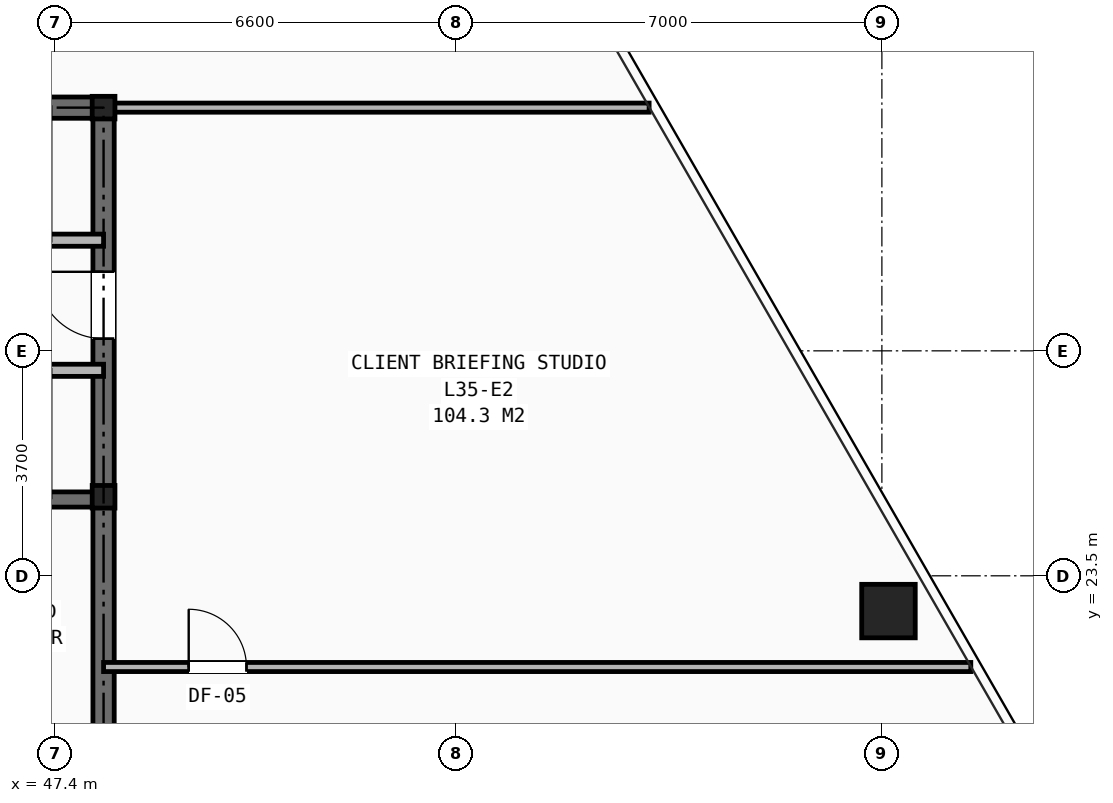
"""IFC4 building model, lengths in metres.
Left out: names, types, materials, properties, quantities, classifications, styles, units other than length and angle.
Written with IfcOpenShell. Run it as: python <this file> out.ifc"""

import sys

from ifc_helpers import new_model, si_unit, direction, frame, frame_2d, origin, origin_2d, place, context, subcontext, project, spatial, rectangle, hollow_rectangle, i_section, extrude, element, fill, save


model = new_model("IFC4")
c1 = context("Model", 3, precision=1e-05, world=origin(), true_north=direction((0.0, 1.0)))
c2 = subcontext(c1, "Body", "Model", "MODEL_VIEW")
j1 = project(units=[si_unit("LENGTHUNIT", "METRE"), si_unit("PLANEANGLEUNIT", "RADIAN")], contexts=[c1])
p1 = place(None, origin())
s1 = spatial("IfcSite", under=j1, at=p1, CompositionType="ELEMENT")
p2 = place(p1, origin())
s2 = spatial("IfcBuilding", under=s1, at=p2, CompositionType="ELEMENT")
p3 = place(p2, frame((0.0, 0.0, 122.9)))
s3 = spatial("IfcBuildingStorey", under=s2, at=p3, CompositionType="ELEMENT", Elevation=122.9)
for number, where, z_axis, x_axis in (
    (1, (48.2, 24.8, 0.0), (0.0, 0.0, 1.0), (1.0, 0.0, 0.0)),
    (2, (48.2, 31.2, 0.0), (0.0, 0.0, 1.0), (1.0, 0.0, 0.0)),
):
    element("IfcColumn", number, at=place(p3, frame(where, z_axis=z_axis, x_axis=x_axis)), inside=s3, PredefinedType="COLUMN", context=c2, shape_type="SweptSolid", body=[
        extrude(i_section(OverallWidth=0.374, OverallDepth=0.372, WebThickness=0.016, FlangeThickness=0.026, at=origin_2d()), origin(), (0.0, 0.0, 1.0), 3.45),
    ])
p4 = place(p3, frame((61.108, 22.92, 0.0), z_axis=(0.0, 0.0, 1.0), x_axis=(1.0, 0.0, 0.0)))
e3 = element("IfcColumn", 3, at=p4, inside=s3, PredefinedType="COLUMN", context=c2, shape_type="SweptSolid", body=[
    extrude(hollow_rectangle(XDim=0.88, YDim=0.88, WallThickness=0.06, at=origin_2d()), origin(), (0.0, 0.0, 1.0), 3.45),
])
p5 = place(p3, frame((31.8, 31.2, 0.0), z_axis=(0.0, 0.0, 1.0), x_axis=(1.0, 0.0, 0.0)))
e4 = element("IfcWall", 4, at=p5, inside=s3, PredefinedType="SHEAR", context=c2, shape_type="SweptSolid", body=[
    extrude(rectangle(XDim=16.4, YDim=0.35, at=frame_2d((8.2, 0.0))), origin(), (0.0, 0.0, 1.0), 3.21),
])
p6 = place(p3, frame((48.2, 16.4, 0.0), z_axis=(0.0, 0.0, 1.0), x_axis=(0.0, 1.0, 0.0)))
e5 = element("IfcWall", 5, at=p6, inside=s3, PredefinedType="SHEAR", context=c2, shape_type="SweptSolid", body=[
    extrude(rectangle(XDim=14.8, YDim=0.35, at=frame_2d((7.4, 0.0))), origin(), (0.0, 0.0, 1.0), 3.21),
])
p7 = place(p6, frame((11.0, 0.0, 0.0)))
e6 = element("IfcOpeningElement", 6, at=p7, cuts=e5, PredefinedType="OPENING", context=c2, shape_type="SweptSolid", body=[
    extrude(rectangle(XDim=1.1, YDim=2.15, at=frame_2d((0.55, 1.075))), frame((0.0, 0.185, 0.0), z_axis=(0.0, -1.0, 0.0), x_axis=(1.0, 0.0, 0.0)), (0.0, 0.0, 1.0), 0.37),
])
p8 = place(p3, frame((44.955, 24.755, 0.0), z_axis=(0.0, 0.0, 1.0), x_axis=(1.0, 0.0, 0.0)))
e7 = element("IfcWall", 7, at=p8, inside=s3, PredefinedType="SHEAR", context=c2, shape_type="SweptSolid", body=[
    extrude(rectangle(XDim=3.245, YDim=0.25, at=frame_2d((1.623, 0.0))), origin(), (0.0, 0.0, 1.0), 3.21),
])
p9 = place(p3, frame((33.82, 29.02, 0.0), z_axis=(0.0, 0.0, 1.0), x_axis=(1.0, 0.0, 0.0)))
e8 = element("IfcWall", 8, at=p9, inside=s3, PredefinedType="SOLIDWALL", context=c2, shape_type="SweptSolid", body=[
    extrude(rectangle(XDim=14.38, YDim=0.2, at=frame_2d((7.19, 0.0))), origin(), (0.0, 0.0, 1.0), 2.661),
])
p10 = place(p9, frame((3.92, 0.0, 0.0)))
e9 = element("IfcOpeningElement", 9, at=p10, cuts=e8, PredefinedType="OPENING", context=c2, shape_type="SweptSolid", body=[
    extrude(rectangle(XDim=0.9, YDim=2.1, at=frame_2d((0.45, 1.05))), frame((0.0, 0.11, 0.0), z_axis=(0.0, -1.0, 0.0), x_axis=(1.0, 0.0, 0.0)), (0.0, 0.0, 1.0), 0.22),
])
p11 = place(p3, frame((33.82, 26.88, 0.0), z_axis=(0.0, 0.0, 1.0), x_axis=(1.0, 0.0, 0.0)))
e10 = element("IfcWall", 10, at=p11, inside=s3, PredefinedType="SOLIDWALL", context=c2, shape_type="SweptSolid", body=[
    extrude(rectangle(XDim=14.38, YDim=0.2, at=frame_2d((7.19, 0.0))), origin(), (0.0, 0.0, 1.0), 2.661),
])
p12 = place(p11, frame((0.53, 0.0, 0.0)))
e11 = element("IfcOpeningElement", 11, at=p12, cuts=e10, PredefinedType="OPENING", context=c2, shape_type="SweptSolid", body=[
    extrude(rectangle(XDim=1.1, YDim=2.15, at=frame_2d((0.55, 1.075))), frame((0.0, 0.11, 0.0), z_axis=(0.0, -1.0, 0.0), x_axis=(1.0, 0.0, 0.0)), (0.0, 0.0, 1.0), 0.22),
])
p13 = place(p11, frame((2.69, 0.0, 0.0)))
e12 = element("IfcOpeningElement", 12, at=p13, cuts=e10, PredefinedType="OPENING", context=c2, shape_type="SweptSolid", body=[
    extrude(rectangle(XDim=1.1, YDim=2.15, at=frame_2d((0.55, 1.075))), frame((0.0, 0.11, 0.0), z_axis=(0.0, -1.0, 0.0), x_axis=(1.0, 0.0, 0.0)), (0.0, 0.0, 1.0), 0.22),
])
p14 = place(p11, frame((4.85, 0.0, 0.0)))
e13 = element("IfcOpeningElement", 13, at=p14, cuts=e10, PredefinedType="OPENING", context=c2, shape_type="SweptSolid", body=[
    extrude(rectangle(XDim=1.1, YDim=2.15, at=frame_2d((0.55, 1.075))), frame((0.0, 0.11, 0.0), z_axis=(0.0, -1.0, 0.0), x_axis=(1.0, 0.0, 0.0)), (0.0, 0.0, 1.0), 0.22),
])
p15 = place(p11, frame((7.01, 0.0, 0.0)))
e14 = element("IfcOpeningElement", 14, at=p15, cuts=e10, PredefinedType="OPENING", context=c2, shape_type="SweptSolid", body=[
    extrude(rectangle(XDim=1.1, YDim=2.15, at=frame_2d((0.55, 1.075))), frame((0.0, 0.11, 0.0), z_axis=(0.0, -1.0, 0.0), x_axis=(1.0, 0.0, 0.0)), (0.0, 0.0, 1.0), 0.22),
])
p16 = place(p3, frame((48.2, 31.2, 0.0), z_axis=(0.0, 0.0, 1.0), x_axis=(1.0, 0.0, 0.0)))
e15 = element("IfcWall", 15, at=p16, inside=s3, PredefinedType="PARTITIONING", context=c2, shape_type="SweptSolid", body=[
    extrude(rectangle(XDim=8.972, YDim=0.15, at=frame_2d((4.486, 0.0))), origin(), (0.0, 0.0, 1.0), 2.252),
])
p17 = place(p3, frame((48.2, 22.0, 0.0), z_axis=(0.0, 0.0, 1.0), x_axis=(1.0, 0.0, 0.0)))
e16 = element("IfcWall", 16, at=p17, inside=s3, PredefinedType="PARTITIONING", context=c2, shape_type="SweptSolid", body=[
    extrude(rectangle(XDim=14.262, YDim=0.15, at=frame_2d((7.131, 0.0))), origin(), (0.0, 0.0, 1.0), 2.589),
])
p18 = place(p17, frame((1.4, 0.0, 0.0)))
e17 = element("IfcOpeningElement", 17, at=p18, cuts=e16, PredefinedType="OPENING", context=c2, shape_type="SweptSolid", body=[
    extrude(rectangle(XDim=0.95, YDim=2.1, at=frame_2d((0.475, 1.05))), frame((0.0, 0.085, 0.0), z_axis=(0.0, -1.0, 0.0), x_axis=(1.0, 0.0, 0.0)), (0.0, 0.0, 1.0), 0.17),
])
p19 = place(p7, origin())
e18 = element("IfcDoor", 18, at=p19, inside=s3, OperationType="SINGLE_SWING_RIGHT", PredefinedType="DOOR", context=c2, shape_type="SweptSolid", body=[
    extrude(rectangle(XDim=1.1, YDim=2.15, at=frame_2d((0.55, 1.075))), frame((0.0, 0.025, 0.0), z_axis=(0.0, -1.0, 0.0), x_axis=(1.0, 0.0, 0.0)), (0.0, 0.0, 1.0), 0.05),
])
fill(e6, e18)
p20 = place(p18, origin())
e19 = element("IfcDoor", 19, at=p20, inside=s3, OperationType="SINGLE_SWING_LEFT", PredefinedType="DOOR", context=c2, shape_type="SweptSolid", body=[
    extrude(rectangle(XDim=0.95, YDim=2.1, at=frame_2d((0.475, 1.05))), frame((0.0, 0.025, 0.0), z_axis=(0.0, -1.0, 0.0), x_axis=(1.0, 0.0, 0.0)), (0.0, 0.0, 1.0), 0.05),
])
fill(e17, e19)
save(model, sys.argv[1])
